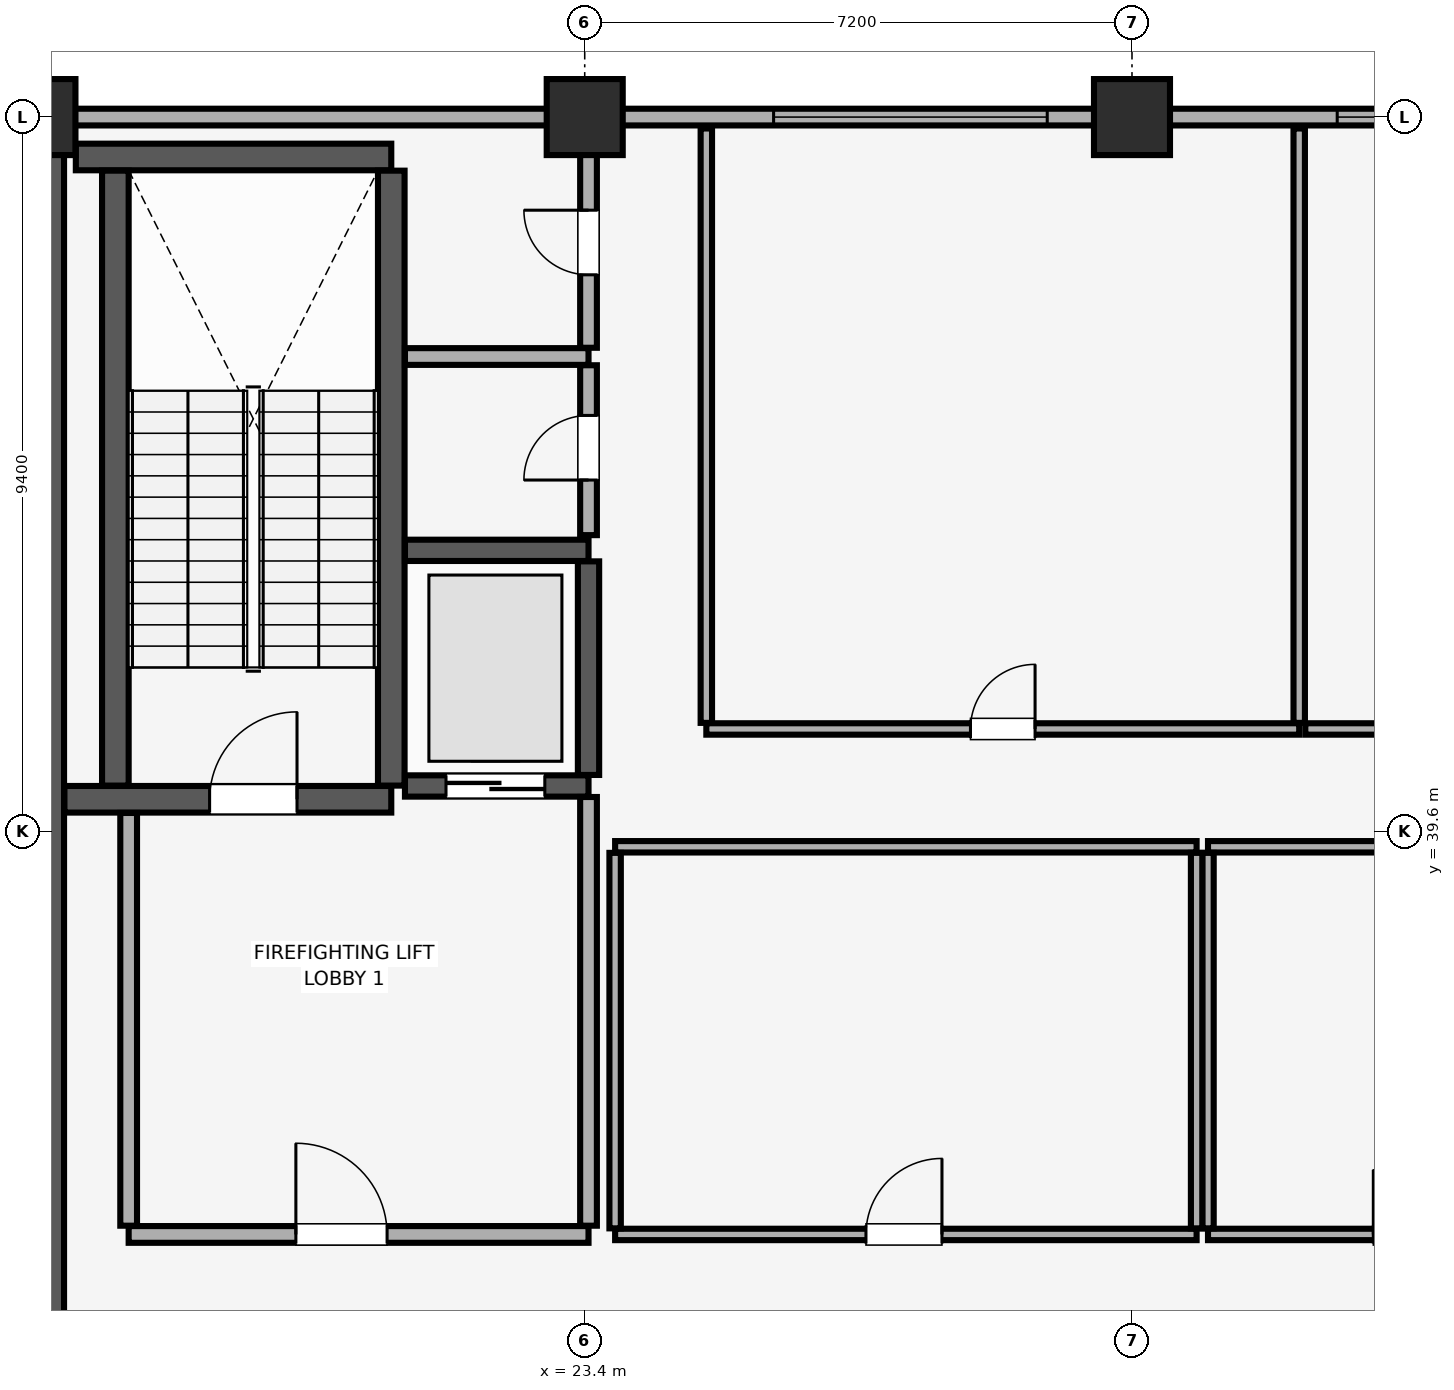
"""IFC4 building model, lengths in metres.
Left out: names, types, materials, properties, quantities, classifications, styles, units other than length and angle.
Written with IfcOpenShell. Run it as: python <this file> out.ifc"""

import sys

from ifc_helpers import new_model, si_unit, direction, frame, frame_2d, origin, origin_2d, place, context, subcontext, project, spatial, rectangle, extrude, element, fill, save


model = new_model("IFC4")
c1 = context("Model", 3, precision=1e-05, world=origin(), true_north=direction((0.0, 1.0)))
c2 = subcontext(c1, "Body", "Model", "MODEL_VIEW")
j1 = project(units=[si_unit("LENGTHUNIT", "METRE"), si_unit("PLANEANGLEUNIT", "RADIAN")], contexts=[c1])
p1 = place(None, origin())
s1 = spatial("IfcSite", under=j1, at=p1, CompositionType="ELEMENT")
p2 = place(p1, origin())
s2 = spatial("IfcBuilding", under=s1, at=p2, CompositionType="ELEMENT")
p3 = place(p2, frame((0.0, 0.0, 305.7)))
s3 = spatial("IfcBuildingStorey", under=s2, at=p3, CompositionType="ELEMENT", Elevation=305.7)
for number, where, z_axis, x_axis in (
    (1, (16.2, 49.0, 0.0), (0.0, 0.0, 1.0), (1.0, 0.0, 0.0)),
    (2, (23.4, 49.0, 0.0), (0.0, 0.0, 1.0), (1.0, 0.0, 0.0)),
    (3, (30.6, 49.0, 0.0), (0.0, 0.0, 1.0), (1.0, 0.0, 0.0)),
):
    element("IfcColumn", number, at=place(p3, frame(where, z_axis=z_axis, x_axis=x_axis)), inside=s3, PredefinedType="COLUMN", context=c2, shape_type="SweptSolid", body=[
        extrude(rectangle(XDim=1.0, YDim=1.0, at=origin_2d()), origin(), (0.0, 0.0, 1.0), 4.7),
    ])
p4 = place(p3, frame((71.4, 49.0, 0.0), z_axis=(0.0, 0.0, 1.0), x_axis=(-1.0, 0.0, 0.0)))
e4 = element("IfcWall", 4, at=p4, inside=s3, PredefinedType="SOLIDWALL", context=c2, shape_type="SweptSolid", body=[
    extrude(rectangle(XDim=58.8, YDim=0.22, at=frame_2d((29.4, 0.0))), origin(), (0.0, 0.0, 1.0), 3.9),
])
p5 = place(p4, frame((56.365, 0.0, 0.85)))
e5 = element("IfcOpeningElement", 5, at=p5, cuts=e4, PredefinedType="OPENING", context=c2, shape_type="SweptSolid", body=[
    extrude(rectangle(XDim=1.5, YDim=1.4, at=frame_2d((0.75, 0.7))), frame((0.0, 0.12, 0.0), z_axis=(0.0, -1.0, 0.0), x_axis=(1.0, 0.0, 0.0)), (0.0, 0.0, 1.0), 0.24),
])
p6 = place(p4, frame((0.935, 0.0, 0.85)))
e6 = element("IfcOpeningElement", 6, at=p6, cuts=e4, PredefinedType="OPENING", context=c2, shape_type="SweptSolid", body=[
    extrude(rectangle(XDim=1.5, YDim=1.4, at=frame_2d((0.75, 0.7))), frame((0.0, 0.12, 0.0), z_axis=(0.0, -1.0, 0.0), x_axis=(1.0, 0.0, 0.0)), (0.0, 0.0, 1.0), 0.24),
])
p7 = place(p4, frame((41.915, 0.0, 0.9)))
e7 = element("IfcOpeningElement", 7, at=p7, cuts=e4, PredefinedType="OPENING", context=c2, shape_type="SweptSolid", body=[
    extrude(rectangle(XDim=3.6, YDim=1.5, at=frame_2d((1.8, 0.75))), frame((0.0, 0.12, 0.0), z_axis=(0.0, -1.0, 0.0), x_axis=(1.0, 0.0, 0.0)), (0.0, 0.0, 1.0), 0.24),
])
p8 = place(p4, frame((35.7, 0.0, 0.9)))
e8 = element("IfcOpeningElement", 8, at=p8, cuts=e4, PredefinedType="OPENING", context=c2, shape_type="SweptSolid", body=[
    extrude(rectangle(XDim=2.4, YDim=1.5, at=frame_2d((1.2, 0.75))), frame((0.0, 0.12, 0.0), z_axis=(0.0, -1.0, 0.0), x_axis=(1.0, 0.0, 0.0)), (0.0, 0.0, 1.0), 0.24),
])
p9 = place(p4, frame((18.95, 0.0, 0.9)))
e9 = element("IfcOpeningElement", 9, at=p9, cuts=e4, PredefinedType="OPENING", context=c2, shape_type="SweptSolid", body=[
    extrude(rectangle(XDim=3.0, YDim=1.5, at=frame_2d((1.5, 0.75))), frame((0.0, 0.12, 0.0), z_axis=(0.0, -1.0, 0.0), x_axis=(1.0, 0.0, 0.0)), (0.0, 0.0, 1.0), 0.24),
])
p10 = place(p4, frame((14.635, 0.0, 0.9)))
e10 = element("IfcOpeningElement", 10, at=p10, cuts=e4, PredefinedType="OPENING", context=c2, shape_type="SweptSolid", body=[
    extrude(rectangle(XDim=2.4, YDim=1.5, at=frame_2d((1.2, 0.75))), frame((0.0, 0.12, 0.0), z_axis=(0.0, -1.0, 0.0), x_axis=(1.0, 0.0, 0.0)), (0.0, 0.0, 1.0), 0.24),
])
p11 = place(p3, frame((16.2, 29.4, 0.0), z_axis=(0.0, 0.0, 1.0), x_axis=(0.0, 1.0, 0.0)))
e11 = element("IfcWall", 11, at=p11, inside=s3, PredefinedType="SHEAR", context=c2, shape_type="SweptSolid", body=[
    extrude(rectangle(XDim=19.2, YDim=0.7, at=frame_2d((9.6, 0.0))), origin(), (0.0, 0.0, 1.0), 4.7),
])
p12 = place(p3, frame((16.555, 40.025, 0.0), z_axis=(0.0, 0.0, 1.0), x_axis=(1.0, 0.0, 0.0)))
e12 = element("IfcWall", 12, at=p12, inside=s3, PredefinedType="SHEAR", context=c2, shape_type="SweptSolid", body=[
    extrude(rectangle(XDim=4.3, YDim=0.35, at=frame_2d((2.15, 0.0))), origin(), (0.0, 0.0, 1.0), 4.7),
])
p13 = place(p12, frame((1.91, 0.0, 0.0)))
e13 = element("IfcOpeningElement", 13, at=p13, cuts=e12, PredefinedType="OPENING", context=c2, shape_type="SweptSolid", body=[
    extrude(rectangle(XDim=1.15, YDim=2.15, at=frame_2d((0.575, 1.075))), frame((0.0, 0.185, 0.0), z_axis=(0.0, -1.0, 0.0), x_axis=(1.0, 0.0, 0.0)), (0.0, 0.0, 1.0), 0.37),
])
p14 = place(p3, frame((16.705, 48.475, 0.0), z_axis=(0.0, 0.0, 1.0), x_axis=(1.0, 0.0, 0.0)))
e14 = element("IfcWall", 14, at=p14, inside=s3, PredefinedType="SHEAR", context=c2, shape_type="SweptSolid", body=[
    extrude(rectangle(XDim=4.15, YDim=0.35, at=frame_2d((2.075, 0.0))), origin(), (0.0, 0.0, 1.0), 4.7),
])
for number, where, z_axis, x_axis in (
    (15, (17.225, 40.205, 0.0), (0.0, 0.0, 1.0), (0.0, 1.0, 0.0)),
    (16, (20.855, 40.205, 0.0), (0.0, 0.0, 1.0), (0.0, 1.0, 0.0)),
):
    element("IfcWall", number, at=place(p3, frame(where, z_axis=z_axis, x_axis=x_axis)), inside=s3, PredefinedType="SHEAR", context=c2, shape_type="SweptSolid", body=[
        extrude(rectangle(XDim=8.09, YDim=0.35, at=frame_2d((4.045, 0.0))), origin(), (0.0, 0.0, 1.0), 4.7),
    ])
p15 = place(p3, frame((21.035, 40.2, 0.0), z_axis=(0.0, 0.0, 1.0), x_axis=(1.0, 0.0, 0.0)))
e17 = element("IfcWall", 17, at=p15, inside=s3, PredefinedType="SHEAR", context=c2, shape_type="SweptSolid", body=[
    extrude(rectangle(XDim=2.415, YDim=0.28, at=frame_2d((1.208, 0.0))), origin(), (0.0, 0.0, 1.0), 4.7),
])
p16 = place(p15, frame((0.54, 0.0, 0.0)))
e18 = element("IfcOpeningElement", 18, at=p16, cuts=e17, PredefinedType="OPENING", context=c2, shape_type="SweptSolid", body=[
    extrude(rectangle(XDim=1.3, YDim=2.3, at=frame_2d((0.65, 1.15))), frame((0.0, 0.15, 0.0), z_axis=(0.0, -1.0, 0.0), x_axis=(1.0, 0.0, 0.0)), (0.0, 0.0, 1.0), 0.3),
])
p17 = place(p3, frame((21.035, 43.3, 0.0), z_axis=(0.0, 0.0, 1.0), x_axis=(1.0, 0.0, 0.0)))
e19 = element("IfcWall", 19, at=p17, inside=s3, PredefinedType="SHEAR", context=c2, shape_type="SweptSolid", body=[
    extrude(rectangle(XDim=2.415, YDim=0.28, at=frame_2d((1.208, 0.0))), origin(), (0.0, 0.0, 1.0), 4.7),
])
p18 = place(p3, frame((23.45, 40.345, 0.0), z_axis=(0.0, 0.0, 1.0), x_axis=(0.0, 1.0, 0.0)))
e20 = element("IfcWall", 20, at=p18, inside=s3, PredefinedType="SHEAR", context=c2, shape_type="SweptSolid", body=[
    extrude(rectangle(XDim=2.81, YDim=0.28, at=frame_2d((1.405, 0.0))), origin(), (0.0, 0.0, 1.0), 4.7),
])
p19 = place(p3, frame((17.4, 34.3, 0.0), z_axis=(0.0, 0.0, 1.0), x_axis=(1.0, 0.0, 0.0)))
e21 = element("IfcWall", 21, at=p19, inside=s3, PredefinedType="PARTITIONING", context=c2, shape_type="SweptSolid", body=[
    extrude(rectangle(XDim=6.05, YDim=0.22, at=frame_2d((3.025, 0.0))), origin(), (0.0, 0.0, 1.0), 4.7),
])
p20 = place(p19, frame((2.2, 0.0, 0.0)))
e22 = element("IfcOpeningElement", 22, at=p20, cuts=e21, PredefinedType="OPENING", context=c2, shape_type="SweptSolid", body=[
    extrude(rectangle(XDim=1.2, YDim=2.15, at=frame_2d((0.6, 1.075))), frame((0.0, 0.12, 0.0), z_axis=(0.0, -1.0, 0.0), x_axis=(1.0, 0.0, 0.0)), (0.0, 0.0, 1.0), 0.24),
])
p21 = place(p3, frame((17.4, 34.415, 0.0), z_axis=(0.0, 0.0, 1.0), x_axis=(0.0, 1.0, 0.0)))
e23 = element("IfcWall", 23, at=p21, inside=s3, PredefinedType="PARTITIONING", context=c2, shape_type="SweptSolid", body=[
    extrude(rectangle(XDim=5.43, YDim=0.22, at=frame_2d((2.715, 0.0))), origin(), (0.0, 0.0, 1.0), 4.7),
])
p22 = place(p3, frame((23.45, 34.415, 0.0), z_axis=(0.0, 0.0, 1.0), x_axis=(0.0, 1.0, 0.0)))
e24 = element("IfcWall", 24, at=p22, inside=s3, PredefinedType="PARTITIONING", context=c2, shape_type="SweptSolid", body=[
    extrude(rectangle(XDim=5.64, YDim=0.22, at=frame_2d((2.82, 0.0))), origin(), (0.0, 0.0, 1.0), 4.7),
])
p23 = place(p3, frame((21.035, 45.85, 0.0), z_axis=(0.0, 0.0, 1.0), x_axis=(1.0, 0.0, 0.0)))
e25 = element("IfcWall", 25, at=p23, inside=s3, PredefinedType="PARTITIONING", context=c2, shape_type="SweptSolid", body=[
    extrude(rectangle(XDim=2.415, YDim=0.22, at=frame_2d((1.208, 0.0))), origin(), (0.0, 0.0, 1.0), 4.7),
])
p24 = place(p3, frame((23.45, 43.5, 0.0), z_axis=(0.0, 0.0, 1.0), x_axis=(0.0, 1.0, 0.0)))
e26 = element("IfcWall", 26, at=p24, inside=s3, PredefinedType="PARTITIONING", context=c2, shape_type="SweptSolid", body=[
    extrude(rectangle(XDim=2.235, YDim=0.22, at=frame_2d((1.118, 0.0))), origin(), (0.0, 0.0, 1.0), 4.7),
])
p25 = place(p24, frame((0.725, 0.0, 0.0)))
e27 = element("IfcOpeningElement", 27, at=p25, cuts=e26, PredefinedType="OPENING", context=c2, shape_type="SweptSolid", body=[
    extrude(rectangle(XDim=0.85, YDim=2.1, at=frame_2d((0.425, 1.05))), frame((0.0, 0.12, 0.0), z_axis=(0.0, -1.0, 0.0), x_axis=(1.0, 0.0, 0.0)), (0.0, 0.0, 1.0), 0.24),
])
p26 = place(p3, frame((23.45, 45.965, 0.0), z_axis=(0.0, 0.0, 1.0), x_axis=(0.0, 1.0, 0.0)))
e28 = element("IfcWall", 28, at=p26, inside=s3, PredefinedType="PARTITIONING", context=c2, shape_type="SweptSolid", body=[
    extrude(rectangle(XDim=2.885, YDim=0.22, at=frame_2d((1.442, 0.0))), origin(), (0.0, 0.0, 1.0), 4.7),
])
p27 = place(p26, frame((0.96, 0.0, 0.0)))
e29 = element("IfcOpeningElement", 29, at=p27, cuts=e28, PredefinedType="OPENING", context=c2, shape_type="SweptSolid", body=[
    extrude(rectangle(XDim=0.85, YDim=2.1, at=frame_2d((0.425, 1.05))), frame((0.0, 0.12, 0.0), z_axis=(0.0, -1.0, 0.0), x_axis=(1.0, 0.0, 0.0)), (0.0, 0.0, 1.0), 0.24),
])
p28 = place(p3, frame((31.6, 34.3, 0.0), z_axis=(0.0, 0.0, 1.0), x_axis=(1.0, 0.0, 0.0)))
e30 = element("IfcWall", 30, at=p28, inside=s3, PredefinedType="PARTITIONING", context=c2, shape_type="SweptSolid", body=[
    extrude(rectangle(XDim=5.2, YDim=0.15, at=frame_2d((2.6, 0.0))), origin(), (0.0, 0.0, 1.0), 4.7),
])
p29 = place(p28, frame((2.175, 0.0, 0.0)))
e31 = element("IfcOpeningElement", 31, at=p29, cuts=e30, PredefinedType="OPENING", context=c2, shape_type="SweptSolid", body=[
    extrude(rectangle(XDim=0.85, YDim=2.1, at=frame_2d((0.425, 1.05))), frame((0.0, 0.085, 0.0), z_axis=(0.0, -1.0, 0.0), x_axis=(1.0, 0.0, 0.0)), (0.0, 0.0, 1.0), 0.17),
])
p30 = place(p3, frame((31.6, 39.4, 0.0), z_axis=(0.0, 0.0, 1.0), x_axis=(1.0, 0.0, 0.0)))
e32 = element("IfcWall", 32, at=p30, inside=s3, PredefinedType="PARTITIONING", context=c2, shape_type="SweptSolid", body=[
    extrude(rectangle(XDim=5.2, YDim=0.15, at=frame_2d((2.6, 0.0))), origin(), (0.0, 0.0, 1.0), 4.7),
])
p31 = place(p3, frame((31.6, 34.38, 0.0), z_axis=(0.0, 0.0, 1.0), x_axis=(0.0, 1.0, 0.0)))
e33 = element("IfcWall", 33, at=p31, inside=s3, PredefinedType="PARTITIONING", context=c2, shape_type="SweptSolid", body=[
    extrude(rectangle(XDim=4.94, YDim=0.15, at=frame_2d((2.47, 0.0))), origin(), (0.0, 0.0, 1.0), 4.7),
])
p32 = place(p3, frame((23.8, 34.3, 0.0), z_axis=(0.0, 0.0, 1.0), x_axis=(1.0, 0.0, 0.0)))
e34 = element("IfcWall", 34, at=p32, inside=s3, PredefinedType="PARTITIONING", context=c2, shape_type="SweptSolid", body=[
    extrude(rectangle(XDim=7.65, YDim=0.15, at=frame_2d((3.825, 0.0))), origin(), (0.0, 0.0, 1.0), 4.7),
])
p33 = place(p32, frame((3.3, 0.0, 0.0)))
e35 = element("IfcOpeningElement", 35, at=p33, cuts=e34, PredefinedType="OPENING", context=c2, shape_type="SweptSolid", body=[
    extrude(rectangle(XDim=1.0, YDim=2.15, at=frame_2d((0.5, 1.075))), frame((0.0, 0.085, 0.0), z_axis=(0.0, -1.0, 0.0), x_axis=(1.0, 0.0, 0.0)), (0.0, 0.0, 1.0), 0.17),
])
p34 = place(p3, frame((23.8, 39.4, 0.0), z_axis=(0.0, 0.0, 1.0), x_axis=(1.0, 0.0, 0.0)))
e36 = element("IfcWall", 36, at=p34, inside=s3, PredefinedType="PARTITIONING", context=c2, shape_type="SweptSolid", body=[
    extrude(rectangle(XDim=7.65, YDim=0.15, at=frame_2d((3.825, 0.0))), origin(), (0.0, 0.0, 1.0), 4.7),
])
for number, where, z_axis, x_axis in (
    (37, (23.8, 34.38, 0.0), (0.0, 0.0, 1.0), (0.0, 1.0, 0.0)),
    (38, (31.45, 34.38, 0.0), (0.0, 0.0, 1.0), (0.0, 1.0, 0.0)),
):
    element("IfcWall", number, at=place(p3, frame(where, z_axis=z_axis, x_axis=x_axis)), inside=s3, PredefinedType="PARTITIONING", context=c2, shape_type="SweptSolid", body=[
        extrude(rectangle(XDim=4.94, YDim=0.15, at=frame_2d((2.47, 0.0))), origin(), (0.0, 0.0, 1.0), 4.7),
    ])
p35 = place(p3, frame((25.0, 40.95, 0.0), z_axis=(0.0, 0.0, 1.0), x_axis=(1.0, 0.0, 0.0)))
e39 = element("IfcWall", 39, at=p35, inside=s3, PredefinedType="PARTITIONING", context=c2, shape_type="SweptSolid", body=[
    extrude(rectangle(XDim=7.8, YDim=0.15, at=frame_2d((3.9, 0.0))), origin(), (0.0, 0.0, 1.0), 4.7),
])
p36 = place(p35, frame((3.475, 0.0, 0.0)))
e40 = element("IfcOpeningElement", 40, at=p36, cuts=e39, PredefinedType="OPENING", context=c2, shape_type="SweptSolid", body=[
    extrude(rectangle(XDim=0.85, YDim=2.1, at=frame_2d((0.425, 1.05))), frame((0.0, 0.085, 0.0), z_axis=(0.0, -1.0, 0.0), x_axis=(1.0, 0.0, 0.0)), (0.0, 0.0, 1.0), 0.17),
])
for number, where, z_axis, x_axis in (
    (41, (25.0, 41.03, 0.0), (0.0, 0.0, 1.0), (0.0, 1.0, 0.0)),
    (42, (32.8, 41.03, 0.0), (0.0, 0.0, 1.0), (0.0, 1.0, 0.0)),
):
    element("IfcWall", number, at=place(p3, frame(where, z_axis=z_axis, x_axis=x_axis)), inside=s3, PredefinedType="PARTITIONING", context=c2, shape_type="SweptSolid", body=[
        extrude(rectangle(XDim=7.82, YDim=0.15, at=frame_2d((3.91, 0.0))), origin(), (0.0, 0.0, 1.0), 4.7),
    ])
p37 = place(p3, frame((32.88, 40.95, 0.0), z_axis=(0.0, 0.0, 1.0), x_axis=(1.0, 0.0, 0.0)))
e43 = element("IfcWall", 43, at=p37, inside=s3, PredefinedType="PARTITIONING", context=c2, shape_type="SweptSolid", body=[
    extrude(rectangle(XDim=3.32, YDim=0.15, at=frame_2d((1.66, 0.0))), origin(), (0.0, 0.0, 1.0), 4.7),
])
p38 = place(p37, frame((1.12, 0.0, 0.0)))
e44 = element("IfcOpeningElement", 44, at=p38, cuts=e43, PredefinedType="OPENING", context=c2, shape_type="SweptSolid", body=[
    extrude(rectangle(XDim=1.0, YDim=2.15, at=frame_2d((0.5, 1.075))), frame((0.0, 0.085, 0.0), z_axis=(0.0, -1.0, 0.0), x_axis=(1.0, 0.0, 0.0)), (0.0, 0.0, 1.0), 0.17),
])
p39 = place(p7, origin())
e45 = element("IfcWindow", 45, at=p39, inside=s3, PartitioningType="SINGLE_PANEL", PredefinedType="WINDOW", context=c2, shape_type="SweptSolid", body=[
    extrude(rectangle(XDim=3.6, YDim=1.5, at=frame_2d((1.8, 0.75))), frame((0.0, 0.03, 0.0), z_axis=(0.0, -1.0, 0.0), x_axis=(1.0, 0.0, 0.0)), (0.0, 0.0, 1.0), 0.06),
])
fill(e7, e45)
p40 = place(p8, origin())
e46 = element("IfcWindow", 46, at=p40, inside=s3, PartitioningType="SINGLE_PANEL", PredefinedType="WINDOW", context=c2, shape_type="SweptSolid", body=[
    extrude(rectangle(XDim=2.4, YDim=1.5, at=frame_2d((1.2, 0.75))), frame((0.0, 0.03, 0.0), z_axis=(0.0, -1.0, 0.0), x_axis=(1.0, 0.0, 0.0)), (0.0, 0.0, 1.0), 0.06),
])
fill(e8, e46)
p41 = place(p13, origin())
e47 = element("IfcDoor", 47, at=p41, inside=s3, OperationType="SINGLE_SWING_RIGHT", PredefinedType="DOOR", context=c2, shape_type="SweptSolid", body=[
    extrude(rectangle(XDim=1.15, YDim=2.15, at=frame_2d((0.575, 1.075))), frame((0.0, 0.025, 0.0), z_axis=(0.0, -1.0, 0.0), x_axis=(1.0, 0.0, 0.0)), (0.0, 0.0, 1.0), 0.05),
])
fill(e13, e47)
p42 = place(p16, origin())
e48 = element("IfcDoor", 48, at=p42, inside=s3, OperationType="DOUBLE_DOOR_SLIDING", PredefinedType="DOOR", context=c2, shape_type="SweptSolid", body=[
    extrude(rectangle(XDim=1.3, YDim=2.3, at=frame_2d((0.65, 1.15))), frame((0.0, 0.025, 0.0), z_axis=(0.0, -1.0, 0.0), x_axis=(1.0, 0.0, 0.0)), (0.0, 0.0, 1.0), 0.05),
])
fill(e18, e48)
p43 = place(p20, origin())
e49 = element("IfcDoor", 49, at=p43, inside=s3, OperationType="SINGLE_SWING_LEFT", PredefinedType="DOOR", context=c2, shape_type="SweptSolid", body=[
    extrude(rectangle(XDim=1.2, YDim=2.15, at=frame_2d((0.6, 1.075))), frame((0.0, 0.025, 0.0), z_axis=(0.0, -1.0, 0.0), x_axis=(1.0, 0.0, 0.0)), (0.0, 0.0, 1.0), 0.05),
])
fill(e22, e49)
p44 = place(p25, origin())
e50 = element("IfcDoor", 50, at=p44, inside=s3, OperationType="SINGLE_SWING_LEFT", PredefinedType="DOOR", context=c2, shape_type="SweptSolid", body=[
    extrude(rectangle(XDim=0.85, YDim=2.1, at=frame_2d((0.425, 1.05))), frame((0.0, 0.025, 0.0), z_axis=(0.0, -1.0, 0.0), x_axis=(1.0, 0.0, 0.0)), (0.0, 0.0, 1.0), 0.05),
])
fill(e27, e50)
p45 = place(p27, origin())
e51 = element("IfcDoor", 51, at=p45, inside=s3, OperationType="SINGLE_SWING_RIGHT", PredefinedType="DOOR", context=c2, shape_type="SweptSolid", body=[
    extrude(rectangle(XDim=0.85, YDim=2.1, at=frame_2d((0.425, 1.05))), frame((0.0, 0.025, 0.0), z_axis=(0.0, -1.0, 0.0), x_axis=(1.0, 0.0, 0.0)), (0.0, 0.0, 1.0), 0.05),
])
fill(e29, e51)
p46 = place(p29, origin())
e52 = element("IfcDoor", 52, at=p46, inside=s3, OperationType="SINGLE_SWING_LEFT", PredefinedType="DOOR", context=c2, shape_type="SweptSolid", body=[
    extrude(rectangle(XDim=0.85, YDim=2.1, at=frame_2d((0.425, 1.05))), frame((0.0, 0.025, 0.0), z_axis=(0.0, -1.0, 0.0), x_axis=(1.0, 0.0, 0.0)), (0.0, 0.0, 1.0), 0.05),
])
fill(e31, e52)
p47 = place(p33, origin())
e53 = element("IfcDoor", 53, at=p47, inside=s3, OperationType="SINGLE_SWING_RIGHT", PredefinedType="DOOR", context=c2, shape_type="SweptSolid", body=[
    extrude(rectangle(XDim=1.0, YDim=2.15, at=frame_2d((0.5, 1.075))), frame((0.0, 0.025, 0.0), z_axis=(0.0, -1.0, 0.0), x_axis=(1.0, 0.0, 0.0)), (0.0, 0.0, 1.0), 0.05),
])
fill(e35, e53)
p48 = place(p36, origin())
e54 = element("IfcDoor", 54, at=p48, inside=s3, OperationType="SINGLE_SWING_RIGHT", PredefinedType="DOOR", context=c2, shape_type="SweptSolid", body=[
    extrude(rectangle(XDim=0.85, YDim=2.1, at=frame_2d((0.425, 1.05))), frame((0.0, 0.025, 0.0), z_axis=(0.0, -1.0, 0.0), x_axis=(1.0, 0.0, 0.0)), (0.0, 0.0, 1.0), 0.05),
])
fill(e40, e54)
save(model, sys.argv[1])
